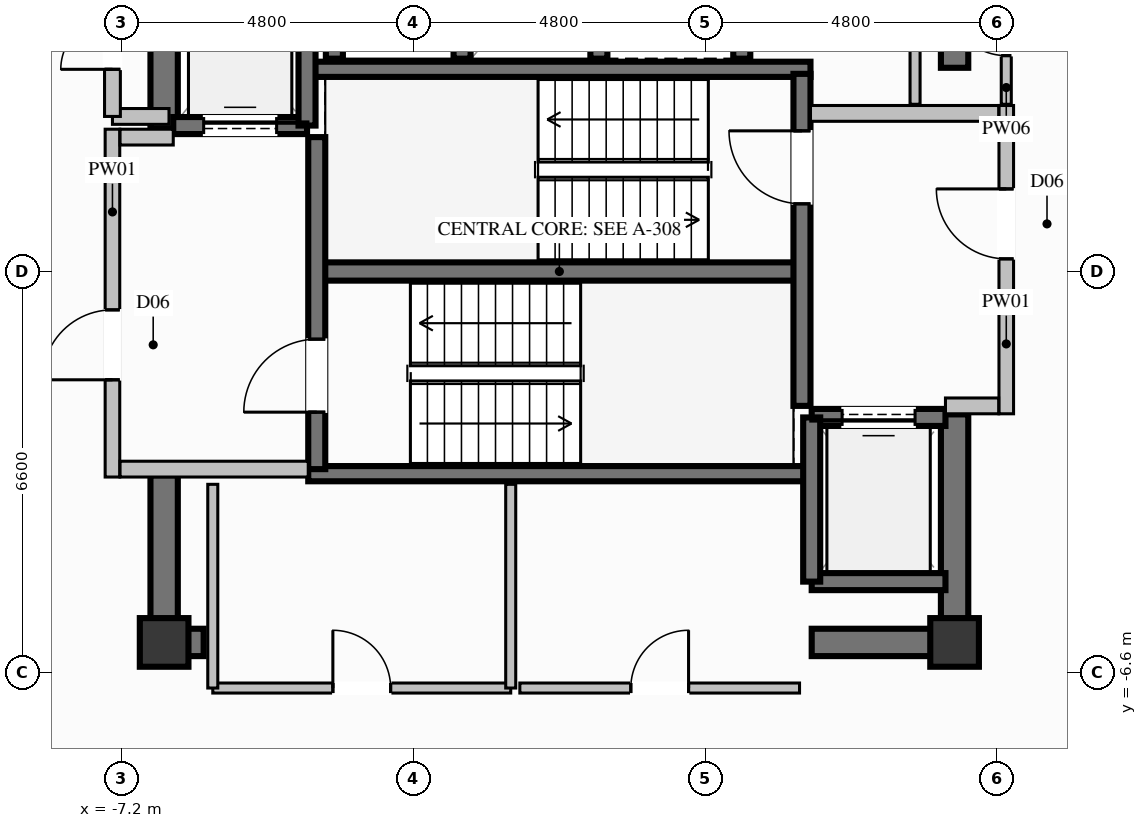
"""IFC4 building model, lengths in metres.
Left out: names, types, materials, properties, quantities, classifications, styles, units other than length and angle.
Written with IfcOpenShell. Run it as: python <this file> out.ifc"""

import sys

from ifc_helpers import new_model, si_unit, direction, frame, frame_2d, origin, origin_2d, place, context, subcontext, project, spatial, rectangle, extrude, element, fill, save


model = new_model("IFC4")
c1 = context("Model", 3, precision=1e-05, world=origin(), true_north=direction((0.0, 1.0)))
c2 = subcontext(c1, "Body", "Model", "MODEL_VIEW")
j1 = project(units=[si_unit("LENGTHUNIT", "METRE"), si_unit("PLANEANGLEUNIT", "RADIAN")], contexts=[c1])
p1 = place(None, origin())
s1 = spatial("IfcSite", under=j1, at=p1, CompositionType="ELEMENT")
p2 = place(p1, origin())
s2 = spatial("IfcBuilding", under=s1, at=p2, CompositionType="ELEMENT")
p3 = place(p2, frame((0.0, 0.0, 266.8)))
s3 = spatial("IfcBuildingStorey", under=s2, at=p3, CompositionType="ELEMENT", Elevation=266.8)
for number, where, z_axis, x_axis in (
    (1, (-6.5, -6.1, 0.0), (0.0, 0.0, 1.0), (1.0, 0.0, 0.0)),
    (2, (6.5, -6.1, 0.0), (0.0, 0.0, 1.0), (1.0, 0.0, 0.0)),
):
    element("IfcColumn", number, at=place(p3, frame(where, z_axis=z_axis, x_axis=x_axis)), inside=s3, PredefinedType="COLUMN", context=c2, shape_type="SweptSolid", body=[
        extrude(rectangle(XDim=0.8, YDim=0.8, at=origin_2d()), origin(), (0.0, 0.0, 1.0), 3.8),
    ])
p4 = place(p3, frame((-3.99, 0.0, 0.0), z_axis=(0.0, 0.0, 1.0), x_axis=(1.0, 0.0, 0.0)))
e3 = element("IfcWall", 3, at=p4, inside=s3, PredefinedType="SHEAR", context=c2, shape_type="SweptSolid", body=[
    extrude(rectangle(XDim=7.98, YDim=0.3, at=frame_2d((3.99, 0.0))), origin(), (0.0, 0.0, 1.0), 3.8),
])
for number, where, z_axis, x_axis in (
    (4, (-4.13, -3.325, 0.0), (0.0, 0.0, 1.0), (1.0, 0.0, 0.0)),
    (5, (-4.13, 3.325, 0.0), (0.0, 0.0, 1.0), (1.0, 0.0, 0.0)),
):
    element("IfcWall", number, at=place(p3, frame(where, z_axis=z_axis, x_axis=x_axis)), inside=s3, PredefinedType="SOLIDWALL", context=c2, shape_type="SweptSolid", body=[
        extrude(rectangle(XDim=8.26, YDim=0.25, at=frame_2d((4.13, 0.0))), origin(), (0.0, 0.0, 1.0), 3.8),
    ])
p5 = place(p3, frame((-6.275, -6.1, 0.0), z_axis=(0.0, 0.0, 1.0), x_axis=(1.0, 0.0, 0.0)))
e6 = element("IfcWall", 6, at=p5, inside=s3, PredefinedType="SHEAR", context=c2, shape_type="SweptSolid", body=[
    extrude(rectangle(XDim=0.425, YDim=0.45, at=frame_2d((0.212, 0.0))), origin(), (0.0, 0.0, 1.0), 3.8),
])
p6 = place(p3, frame((4.15, -6.1, 0.0), z_axis=(0.0, 0.0, 1.0), x_axis=(1.0, 0.0, 0.0)))
e7 = element("IfcWall", 7, at=p6, inside=s3, PredefinedType="SHEAR", context=c2, shape_type="SweptSolid", body=[
    extrude(rectangle(XDim=2.125, YDim=0.45, at=frame_2d((1.062, 0.0))), origin(), (0.0, 0.0, 1.0), 3.8),
])
p7 = place(p3, frame((-6.5, 2.35, 0.0), z_axis=(0.0, 0.0, 1.0), x_axis=(0.0, 1.0, 0.0)))
e8 = element("IfcWall", 8, at=p7, inside=s3, PredefinedType="SHEAR", context=c2, shape_type="SweptSolid", body=[
    extrude(rectangle(XDim=3.975, YDim=0.45, at=frame_2d((1.987, 0.0))), origin(), (0.0, 0.0, 1.0), 3.8),
])
p8 = place(p3, frame((-6.5, -6.325, 0.0), z_axis=(0.0, 0.0, 1.0), x_axis=(0.0, 1.0, 0.0)))
e9 = element("IfcWall", 9, at=p8, inside=s3, PredefinedType="SHEAR", context=c2, shape_type="SweptSolid", body=[
    extrude(rectangle(XDim=2.975, YDim=0.45, at=frame_2d((1.487, 0.0))), origin(), (0.0, 0.0, 1.0), 3.8),
])
p9 = place(p3, frame((6.5, -6.325, 0.0), z_axis=(0.0, 0.0, 1.0), x_axis=(0.0, 1.0, 0.0)))
e10 = element("IfcWall", 10, at=p9, inside=s3, PredefinedType="SHEAR", context=c2, shape_type="SweptSolid", body=[
    extrude(rectangle(XDim=3.975, YDim=0.45, at=frame_2d((1.987, 0.0))), origin(), (0.0, 0.0, 1.0), 3.8),
])
p10 = place(p3, frame((6.5, 3.35, 0.0), z_axis=(0.0, 0.0, 1.0), x_axis=(0.0, 1.0, 0.0)))
e11 = element("IfcWall", 11, at=p10, inside=s3, PredefinedType="SHEAR", context=c2, shape_type="SweptSolid", body=[
    extrude(rectangle(XDim=2.975, YDim=0.45, at=frame_2d((1.487, 0.0))), origin(), (0.0, 0.0, 1.0), 3.8),
])
for number, where, z_axis, x_axis in (
    (12, (-3.7, 6.0, 0.0), (0.0, 0.0, 1.0), (0.0, -1.0, 0.0)),
    (13, (-1.6, 3.5, 0.0), (0.0, 0.0, 1.0), (0.0, 1.0, 0.0)),
    (14, (0.65, 3.5, 0.0), (0.0, 0.0, 1.0), (0.0, 1.0, 0.0)),
    (15, (3.0, 3.5, 0.0), (0.0, 0.0, 1.0), (0.0, 1.0, 0.0)),
):
    element("IfcWall", number, at=place(p3, frame(where, z_axis=z_axis, x_axis=x_axis)), inside=s3, PredefinedType="SOLIDWALL", context=c2, shape_type="SweptSolid", body=[
        extrude(rectangle(XDim=2.5, YDim=0.28, at=frame_2d((1.25, 0.0))), origin(), (0.0, 0.0, 1.0), 3.57),
    ])
p11 = place(p3, frame((-6.35, 2.4, 0.0), z_axis=(0.0, 0.0, 1.0), x_axis=(1.0, 0.0, 0.0)))
e16 = element("IfcWall", 16, at=p11, inside=s3, PredefinedType="SOLIDWALL", context=c2, shape_type="SweptSolid", body=[
    extrude(rectangle(XDim=2.2, YDim=0.28, at=frame_2d((1.1, 0.0))), origin(), (0.0, 0.0, 1.0), 3.57),
])
p12 = place(p11, frame((0.5, 0.0, 0.0)))
e17 = element("IfcOpeningElement", 17, at=p12, cuts=e16, PredefinedType="OPENING", context=c2, shape_type="SweptSolid", body=[
    extrude(rectangle(XDim=1.2, YDim=2.2, at=frame_2d((0.6, 1.1))), frame((0.0, 0.15, 0.0), z_axis=(0.0, -1.0, 0.0), x_axis=(1.0, 0.0, 0.0)), (0.0, 0.0, 1.0), 0.3),
])
p13 = place(p3, frame((-4.15, 2.4, 0.0), z_axis=(0.0, 0.0, 1.0), x_axis=(0.0, 1.0, 0.0)))
e18 = element("IfcWall", 18, at=p13, inside=s3, PredefinedType="SOLIDWALL", context=c2, shape_type="SweptSolid", body=[
    extrude(rectangle(XDim=2.7, YDim=0.28, at=frame_2d((1.35, 0.0))), origin(), (0.0, 0.0, 1.0), 3.57),
])
p14 = place(p3, frame((4.15, -5.1, 0.0), z_axis=(0.0, 0.0, 1.0), x_axis=(1.0, 0.0, 0.0)))
e19 = element("IfcWall", 19, at=p14, inside=s3, PredefinedType="SOLIDWALL", context=c2, shape_type="SweptSolid", body=[
    extrude(rectangle(XDim=2.2, YDim=0.28, at=frame_2d((1.1, 0.0))), origin(), (0.0, 0.0, 1.0), 3.57),
])
p15 = place(p3, frame((6.35, -2.4, 0.0), z_axis=(0.0, 0.0, 1.0), x_axis=(-1.0, 0.0, 0.0)))
e20 = element("IfcWall", 20, at=p15, inside=s3, PredefinedType="SOLIDWALL", context=c2, shape_type="SweptSolid", body=[
    extrude(rectangle(XDim=2.2, YDim=0.28, at=frame_2d((1.1, 0.0))), origin(), (0.0, 0.0, 1.0), 3.57),
])
p16 = place(p15, frame((0.5, 0.0, 0.0)))
e21 = element("IfcOpeningElement", 21, at=p16, cuts=e20, PredefinedType="OPENING", context=c2, shape_type="SweptSolid", body=[
    extrude(rectangle(XDim=1.2, YDim=2.2, at=frame_2d((0.6, 1.1))), frame((0.0, 0.15, 0.0), z_axis=(0.0, -1.0, 0.0), x_axis=(1.0, 0.0, 0.0)), (0.0, 0.0, 1.0), 0.3),
])
p17 = place(p3, frame((4.15, -2.4, 0.0), z_axis=(0.0, 0.0, 1.0), x_axis=(0.0, -1.0, 0.0)))
e22 = element("IfcWall", 22, at=p17, inside=s3, PredefinedType="SOLIDWALL", context=c2, shape_type="SweptSolid", body=[
    extrude(rectangle(XDim=2.7, YDim=0.28, at=frame_2d((1.35, 0.0))), origin(), (0.0, 0.0, 1.0), 3.57),
])
p18 = place(p3, frame((-3.99, -3.25, 0.0), z_axis=(0.0, 0.0, 1.0), x_axis=(0.0, 1.0, 0.0)))
e23 = element("IfcWall", 23, at=p18, inside=s3, PredefinedType="SOLIDWALL", context=c2, shape_type="SweptSolid", body=[
    extrude(rectangle(XDim=5.46, YDim=0.28, at=frame_2d((2.73, 0.0))), origin(), (0.0, 0.0, 1.0), 3.57),
])
p19 = place(p18, frame((0.937, 0.0, 0.0)))
e24 = element("IfcOpeningElement", 24, at=p19, cuts=e23, PredefinedType="OPENING", context=c2, shape_type="SweptSolid", body=[
    extrude(rectangle(XDim=1.2, YDim=2.2, at=frame_2d((0.6, 1.1))), frame((0.0, 0.15, 0.0), z_axis=(0.0, -1.0, 0.0), x_axis=(1.0, 0.0, 0.0)), (0.0, 0.0, 1.0), 0.3),
])
p20 = place(p3, frame((3.99, -2.21, 0.0), z_axis=(0.0, 0.0, 1.0), x_axis=(0.0, 1.0, 0.0)))
e25 = element("IfcWall", 25, at=p20, inside=s3, PredefinedType="SOLIDWALL", context=c2, shape_type="SweptSolid", body=[
    extrude(rectangle(XDim=5.46, YDim=0.28, at=frame_2d((2.73, 0.0))), origin(), (0.0, 0.0, 1.0), 3.57),
])
p21 = place(p20, frame((3.323, 0.0, 0.0)))
e26 = element("IfcOpeningElement", 26, at=p21, cuts=e25, PredefinedType="OPENING", context=c2, shape_type="SweptSolid", body=[
    extrude(rectangle(XDim=1.2, YDim=2.2, at=frame_2d((0.6, 1.1))), frame((0.0, 0.15, 0.0), z_axis=(0.0, -1.0, 0.0), x_axis=(1.0, 0.0, 0.0)), (0.0, 0.0, 1.0), 0.3),
])
p22 = place(p3, frame((-7.35, -3.38, 0.0), z_axis=(0.0, 0.0, 1.0), x_axis=(0.0, 1.0, 0.0)))
e27 = element("IfcWall", 27, at=p22, inside=s3, PredefinedType="PARTITIONING", context=c2, shape_type="SweptSolid", body=[
    extrude(rectangle(XDim=5.72, YDim=0.24, at=frame_2d((2.86, 0.0))), origin(), (0.0, 0.0, 1.0), 2.655),
])
p23 = place(p22, frame((1.599, 0.0, 0.0)))
e28 = element("IfcOpeningElement", 28, at=p23, cuts=e27, PredefinedType="OPENING", context=c2, shape_type="SweptSolid", body=[
    extrude(rectangle(XDim=1.15, YDim=2.2, at=frame_2d((0.575, 1.1))), frame((0.0, 0.13, 0.0), z_axis=(0.0, -1.0, 0.0), x_axis=(1.0, 0.0, 0.0)), (0.0, 0.0, 1.0), 0.26),
])
p24 = place(p3, frame((-7.225, -3.25, 0.0), z_axis=(0.0, 0.0, 1.0), x_axis=(1.0, 0.0, 0.0)))
e29 = element("IfcWall", 29, at=p24, inside=s3, PredefinedType="PARTITIONING", context=c2, shape_type="SweptSolid", body=[
    extrude(rectangle(XDim=3.095, YDim=0.26, at=frame_2d((1.548, 0.0))), origin(), (0.0, 0.0, 1.0), 3.57),
])
p25 = place(p3, frame((-7.225, 2.21, 0.0), z_axis=(0.0, 0.0, 1.0), x_axis=(1.0, 0.0, 0.0)))
e30 = element("IfcWall", 30, at=p25, inside=s3, PredefinedType="PARTITIONING", context=c2, shape_type="SweptSolid", body=[
    extrude(rectangle(XDim=0.875, YDim=0.26, at=frame_2d((0.438, 0.0))), origin(), (0.0, 0.0, 1.0), 3.57),
])
p26 = place(p3, frame((7.35, -2.34, 0.0), z_axis=(0.0, 0.0, 1.0), x_axis=(0.0, 1.0, 0.0)))
e31 = element("IfcWall", 31, at=p26, inside=s3, PredefinedType="PARTITIONING", context=c2, shape_type="SweptSolid", body=[
    extrude(rectangle(XDim=5.07, YDim=0.24, at=frame_2d((2.535, 0.0))), origin(), (0.0, 0.0, 1.0), 2.655),
])
p27 = place(p26, frame((2.548, 0.0, 0.0)))
e32 = element("IfcOpeningElement", 32, at=p27, cuts=e31, PredefinedType="OPENING", context=c2, shape_type="SweptSolid", body=[
    extrude(rectangle(XDim=1.15, YDim=2.2, at=frame_2d((0.575, 1.1))), frame((0.0, 0.13, 0.0), z_axis=(0.0, -1.0, 0.0), x_axis=(1.0, 0.0, 0.0)), (0.0, 0.0, 1.0), 0.26),
])
p28 = place(p3, frame((6.35, -2.21, 0.0), z_axis=(0.0, 0.0, 1.0), x_axis=(1.0, 0.0, 0.0)))
e33 = element("IfcWall", 33, at=p28, inside=s3, PredefinedType="PARTITIONING", context=c2, shape_type="SweptSolid", body=[
    extrude(rectangle(XDim=0.875, YDim=0.26, at=frame_2d((0.438, 0.0))), origin(), (0.0, 0.0, 1.0), 3.57),
])
p29 = place(p3, frame((4.13, 2.6, 0.0), z_axis=(0.0, 0.0, 1.0), x_axis=(1.0, 0.0, 0.0)))
e34 = element("IfcWall", 34, at=p29, inside=s3, PredefinedType="PARTITIONING", context=c2, shape_type="SweptSolid", body=[
    extrude(rectangle(XDim=3.095, YDim=0.26, at=frame_2d((1.548, 0.0))), origin(), (0.0, 0.0, 1.0), 3.57),
])
p30 = place(p3, frame((-7.35, 2.55, 0.0), z_axis=(0.0, 0.0, 1.0), x_axis=(1.0, 0.0, 0.0)))
e35 = element("IfcWall", 35, at=p30, inside=s3, PredefinedType="PARTITIONING", context=c2, shape_type="SweptSolid", body=[
    extrude(rectangle(XDim=0.93, YDim=0.26, at=frame_2d((0.465, 0.0))), origin(), (0.0, 0.0, 1.0), 3.57),
])
p31 = place(p3, frame((-7.35, 2.55, 0.0), z_axis=(0.0, 0.0, 1.0), x_axis=(0.0, 1.0, 0.0)))
e36 = element("IfcWall", 36, at=p31, inside=s3, PredefinedType="PARTITIONING", context=c2, shape_type="SweptSolid", body=[
    extrude(rectangle(XDim=2.4, YDim=0.26, at=frame_2d((1.2, 0.0))), origin(), (0.0, 0.0, 1.0), 2.655),
])
p32 = place(p31, frame((0.775, 0.0, 0.0)))
e37 = element("IfcOpeningElement", 37, at=p32, cuts=e36, PredefinedType="OPENING", context=c2, shape_type="SweptSolid", body=[
    extrude(rectangle(XDim=0.85, YDim=2.05, at=frame_2d((0.425, 1.025))), frame((0.0, 0.14, 0.0), z_axis=(0.0, -1.0, 0.0), x_axis=(1.0, 0.0, 0.0)), (0.0, 0.0, 1.0), 0.28),
])
p33 = place(p3, frame((7.35, 2.75, 0.0), z_axis=(0.0, 0.0, 1.0), x_axis=(0.0, 1.0, 0.0)))
e38 = element("IfcWall", 38, at=p33, inside=s3, PredefinedType="PARTITIONING", context=c2, shape_type="SweptSolid", body=[
    extrude(rectangle(XDim=2.55, YDim=0.165, at=frame_2d((1.275, 0.0))), origin(), (0.0, 0.0, 1.0), 3.57),
])
p34 = place(p33, frame((0.8, 0.0, 0.0)))
e39 = element("IfcOpeningElement", 39, at=p34, cuts=e38, PredefinedType="OPENING", context=c2, shape_type="SweptSolid", body=[
    extrude(rectangle(XDim=0.95, YDim=2.1, at=frame_2d((0.475, 1.05))), frame((0.0, 0.093, 0.0), z_axis=(0.0, -1.0, 0.0), x_axis=(1.0, 0.0, 0.0)), (0.0, 0.0, 1.0), 0.185),
])
p35 = place(p3, frame((5.85, 5.3, 0.0), z_axis=(0.0, 0.0, 1.0), x_axis=(0.0, -1.0, 0.0)))
e40 = element("IfcWall", 40, at=p35, inside=s3, PredefinedType="PARTITIONING", context=c2, shape_type="SweptSolid", body=[
    extrude(rectangle(XDim=2.55, YDim=0.165, at=frame_2d((1.275, 0.0))), origin(), (0.0, 0.0, 1.0), 2.655),
])
p36 = place(p3, frame((-5.7, -6.85, 0.0), z_axis=(0.0, 0.0, 1.0), x_axis=(1.0, 0.0, 0.0)))
e41 = element("IfcWall", 41, at=p36, inside=s3, PredefinedType="PARTITIONING", context=c2, shape_type="SweptSolid", body=[
    extrude(rectangle(XDim=4.9, YDim=0.165, at=frame_2d((2.45, 0.0))), origin(), (0.0, 0.0, 1.0), 2.655),
])
p37 = place(p36, frame((1.975, 0.0, 0.0)))
e42 = element("IfcOpeningElement", 42, at=p37, cuts=e41, PredefinedType="OPENING", context=c2, shape_type="SweptSolid", body=[
    extrude(rectangle(XDim=0.95, YDim=2.1, at=frame_2d((0.475, 1.05))), frame((0.0, 0.093, 0.0), z_axis=(0.0, -1.0, 0.0), x_axis=(1.0, 0.0, 0.0)), (0.0, 0.0, 1.0), 0.185),
])
p38 = place(p3, frame((-0.8, -6.85, 0.0), z_axis=(0.0, 0.0, 1.0), x_axis=(0.0, 1.0, 0.0)))
e43 = element("IfcWall", 43, at=p38, inside=s3, PredefinedType="PARTITIONING", context=c2, shape_type="SweptSolid", body=[
    extrude(rectangle(XDim=3.35, YDim=0.165, at=frame_2d((1.675, 0.0))), origin(), (0.0, 0.0, 1.0), 3.57),
])
p39 = place(p3, frame((-5.7, -3.5, 0.0), z_axis=(0.0, 0.0, 1.0), x_axis=(0.0, -1.0, 0.0)))
e44 = element("IfcWall", 44, at=p39, inside=s3, PredefinedType="PARTITIONING", context=c2, shape_type="SweptSolid", body=[
    extrude(rectangle(XDim=3.35, YDim=0.165, at=frame_2d((1.675, 0.0))), origin(), (0.0, 0.0, 1.0), 2.655),
])
p40 = place(p3, frame((-0.65, -6.85, 0.0), z_axis=(0.0, 0.0, 1.0), x_axis=(1.0, 0.0, 0.0)))
e45 = element("IfcWall", 45, at=p40, inside=s3, PredefinedType="PARTITIONING", context=c2, shape_type="SweptSolid", body=[
    extrude(rectangle(XDim=4.6, YDim=0.165, at=frame_2d((2.3, 0.0))), origin(), (0.0, 0.0, 1.0), 2.655),
])
p41 = place(p40, frame((1.825, 0.0, 0.0)))
e46 = element("IfcOpeningElement", 46, at=p41, cuts=e45, PredefinedType="OPENING", context=c2, shape_type="SweptSolid", body=[
    extrude(rectangle(XDim=0.95, YDim=2.1, at=frame_2d((0.475, 1.05))), frame((0.0, 0.093, 0.0), z_axis=(0.0, -1.0, 0.0), x_axis=(1.0, 0.0, 0.0)), (0.0, 0.0, 1.0), 0.185),
])
p42 = place(p12, origin())
e47 = element("IfcDoor", 47, at=p42, inside=s3, OperationType="SLIDING_TO_LEFT", PredefinedType="DOOR", context=c2, shape_type="SweptSolid", body=[
    extrude(rectangle(XDim=1.2, YDim=2.2, at=frame_2d((0.6, 1.1))), frame((0.0, 0.025, 0.0), z_axis=(0.0, -1.0, 0.0), x_axis=(1.0, 0.0, 0.0)), (0.0, 0.0, 1.0), 0.05),
])
fill(e17, e47)
p43 = place(p16, origin())
e48 = element("IfcDoor", 48, at=p43, inside=s3, OperationType="SLIDING_TO_LEFT", PredefinedType="DOOR", context=c2, shape_type="SweptSolid", body=[
    extrude(rectangle(XDim=1.2, YDim=2.2, at=frame_2d((0.6, 1.1))), frame((0.0, 0.025, 0.0), z_axis=(0.0, -1.0, 0.0), x_axis=(1.0, 0.0, 0.0)), (0.0, 0.0, 1.0), 0.05),
])
fill(e21, e48)
p44 = place(p19, origin())
e49 = element("IfcDoor", 49, at=p44, inside=s3, OperationType="SINGLE_SWING_LEFT", PredefinedType="DOOR", context=c2, shape_type="SweptSolid", body=[
    extrude(rectangle(XDim=1.2, YDim=2.2, at=frame_2d((0.6, 1.1))), frame((0.0, 0.025, 0.0), z_axis=(0.0, -1.0, 0.0), x_axis=(1.0, 0.0, 0.0)), (0.0, 0.0, 1.0), 0.05),
])
fill(e24, e49)
p45 = place(p21, origin())
e50 = element("IfcDoor", 50, at=p45, inside=s3, OperationType="SINGLE_SWING_RIGHT", PredefinedType="DOOR", context=c2, shape_type="SweptSolid", body=[
    extrude(rectangle(XDim=1.2, YDim=2.2, at=frame_2d((0.6, 1.1))), frame((0.0, 0.025, 0.0), z_axis=(0.0, -1.0, 0.0), x_axis=(1.0, 0.0, 0.0)), (0.0, 0.0, 1.0), 0.05),
])
fill(e26, e50)
p46 = place(p23, origin())
e51 = element("IfcDoor", 51, at=p46, inside=s3, OperationType="SINGLE_SWING_LEFT", PredefinedType="DOOR", context=c2, shape_type="SweptSolid", body=[
    extrude(rectangle(XDim=1.15, YDim=2.2, at=frame_2d((0.575, 1.1))), frame((0.0, 0.025, 0.0), z_axis=(0.0, -1.0, 0.0), x_axis=(1.0, 0.0, 0.0)), (0.0, 0.0, 1.0), 0.05),
])
fill(e28, e51)
p47 = place(p27, origin())
e52 = element("IfcDoor", 52, at=p47, inside=s3, OperationType="SINGLE_SWING_RIGHT", PredefinedType="DOOR", context=c2, shape_type="SweptSolid", body=[
    extrude(rectangle(XDim=1.15, YDim=2.2, at=frame_2d((0.575, 1.1))), frame((0.0, 0.025, 0.0), z_axis=(0.0, -1.0, 0.0), x_axis=(1.0, 0.0, 0.0)), (0.0, 0.0, 1.0), 0.05),
])
fill(e32, e52)
p48 = place(p32, origin())
e53 = element("IfcDoor", 53, at=p48, inside=s3, OperationType="SINGLE_SWING_LEFT", PredefinedType="DOOR", context=c2, shape_type="SweptSolid", body=[
    extrude(rectangle(XDim=0.85, YDim=2.05, at=frame_2d((0.425, 1.025))), frame((0.0, 0.025, 0.0), z_axis=(0.0, -1.0, 0.0), x_axis=(1.0, 0.0, 0.0)), (0.0, 0.0, 1.0), 0.05),
])
fill(e37, e53)
p49 = place(p34, origin())
e54 = element("IfcDoor", 54, at=p49, inside=s3, OperationType="SINGLE_SWING_RIGHT", PredefinedType="DOOR", context=c2, shape_type="SweptSolid", body=[
    extrude(rectangle(XDim=0.95, YDim=2.1, at=frame_2d((0.475, 1.05))), frame((0.0, 0.025, 0.0), z_axis=(0.0, -1.0, 0.0), x_axis=(1.0, 0.0, 0.0)), (0.0, 0.0, 1.0), 0.05),
])
fill(e39, e54)
p50 = place(p37, origin())
e55 = element("IfcDoor", 55, at=p50, inside=s3, OperationType="SINGLE_SWING_LEFT", PredefinedType="DOOR", context=c2, shape_type="SweptSolid", body=[
    extrude(rectangle(XDim=0.95, YDim=2.1, at=frame_2d((0.475, 1.05))), frame((0.0, 0.025, 0.0), z_axis=(0.0, -1.0, 0.0), x_axis=(1.0, 0.0, 0.0)), (0.0, 0.0, 1.0), 0.05),
])
fill(e42, e55)
p51 = place(p41, origin())
e56 = element("IfcDoor", 56, at=p51, inside=s3, OperationType="SINGLE_SWING_RIGHT", PredefinedType="DOOR", context=c2, shape_type="SweptSolid", body=[
    extrude(rectangle(XDim=0.95, YDim=2.1, at=frame_2d((0.475, 1.05))), frame((0.0, 0.025, 0.0), z_axis=(0.0, -1.0, 0.0), x_axis=(1.0, 0.0, 0.0)), (0.0, 0.0, 1.0), 0.05),
])
fill(e46, e56)
save(model, sys.argv[1])
